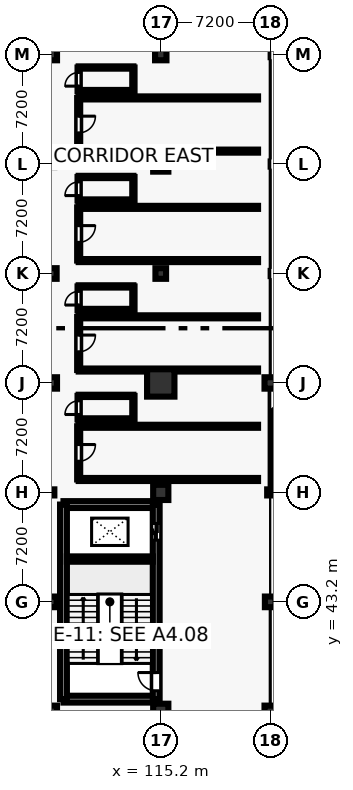
"""IFC4 building model, lengths in metres.
Left out: names, types, materials, properties, quantities, classifications, styles, units other than length and angle.
Written with IfcOpenShell. Run it as: python <this file> out.ifc"""

import sys

from ifc_helpers import new_model, si_unit, direction, frame, frame_2d, origin, origin_2d, place, context, subcontext, project, spatial, rectangle, hollow_rectangle, circle, extrude, element, fill, save


model = new_model("IFC4")
c1 = context("Model", 3, precision=1e-05, world=origin(), true_north=direction((0.0, 1.0)))
c2 = subcontext(c1, "Body", "Model", "MODEL_VIEW")
j1 = project(units=[si_unit("LENGTHUNIT", "METRE"), si_unit("PLANEANGLEUNIT", "RADIAN")], contexts=[c1])
p1 = place(None, origin())
s1 = spatial("IfcSite", under=j1, at=p1, CompositionType="ELEMENT")
p2 = place(p1, origin())
s2 = spatial("IfcBuilding", under=s1, at=p2, CompositionType="ELEMENT")
p3 = place(p2, frame((0.0, 0.0, 9.6)))
s3 = spatial("IfcBuildingStorey", under=s2, at=p3, CompositionType="ELEMENT", Elevation=9.6)
p4 = place(p3, frame((108.0, 36.0, 0.0), z_axis=(0.0, 0.0, 1.0), x_axis=(1.0, 0.0, 0.0)))
e1 = element("IfcColumn", 1, at=p4, inside=s3, PredefinedType="COLUMN", context=c2, shape_type="SweptSolid", body=[
    extrude(rectangle(XDim=0.75, YDim=0.75, at=origin_2d()), origin(), (0.0, 0.0, 1.0), 4.2),
])
p5 = place(p3, frame((108.0, 43.2, 0.0), z_axis=(0.0, 0.0, 1.0), x_axis=(1.0, 0.0, 0.0)))
e2 = element("IfcColumn", 2, at=p5, inside=s3, PredefinedType="COLUMN", context=c2, shape_type="SweptSolid", body=[
    extrude(rectangle(XDim=0.7, YDim=0.7, at=origin_2d()), origin(), (0.0, 0.0, 1.0), 4.2),
])
p6 = place(p3, frame((108.0, 50.4, 0.0), z_axis=(0.0, 0.0, 1.0), x_axis=(1.0, 0.0, 0.0)))
e3 = element("IfcColumn", 3, at=p6, inside=s3, PredefinedType="COLUMN", context=c2, shape_type="SweptSolid", body=[
    extrude(hollow_rectangle(XDim=0.4, YDim=0.4, WallThickness=0.02, at=origin_2d()), origin(), (0.0, 0.0, 1.0), 4.2),
])
p7 = place(p3, frame((108.0, 57.6, 0.0), z_axis=(0.0, 0.0, 1.0), x_axis=(1.0, 0.0, 0.0)))
e4 = element("IfcColumn", 4, at=p7, inside=s3, PredefinedType="COLUMN", context=c2, shape_type="SweptSolid", body=[
    extrude(rectangle(XDim=0.75, YDim=0.75, at=origin_2d()), origin(), (0.0, 0.0, 1.0), 4.2),
])
p8 = place(p3, frame((108.0, 64.8, 0.0), z_axis=(0.0, 0.0, 1.0), x_axis=(1.0, 0.0, 0.0)))
e5 = element("IfcColumn", 5, at=p8, inside=s3, PredefinedType="COLUMN", context=c2, shape_type="SweptSolid", body=[
    extrude(rectangle(XDim=0.7, YDim=0.7, at=origin_2d()), origin(), (0.0, 0.0, 1.0), 4.2),
])
p9 = place(p3, frame((108.0, 72.0, 0.0), z_axis=(0.0, 0.0, 1.0), x_axis=(1.0, 0.0, 0.0)))
e6 = element("IfcColumn", 6, at=p9, inside=s3, PredefinedType="COLUMN", context=c2, shape_type="SweptSolid", body=[
    extrude(hollow_rectangle(XDim=0.4, YDim=0.4, WallThickness=0.02, at=origin_2d()), origin(), (0.0, 0.0, 1.0), 4.2),
])
p10 = place(p3, frame((108.0, 79.2, 0.0), z_axis=(0.0, 0.0, 1.0), x_axis=(1.0, 0.0, 0.0)))
e7 = element("IfcColumn", 7, at=p10, inside=s3, PredefinedType="COLUMN", context=c2, shape_type="SweptSolid", body=[
    extrude(rectangle(XDim=0.75, YDim=0.75, at=origin_2d()), origin(), (0.0, 0.0, 1.0), 4.2),
])
for number, where, z_axis, x_axis in (
    (8, (115.2, 36.0, 0.0), (0.0, 0.0, 1.0), (1.0, 0.0, 0.0)),
    (9, (115.2, 50.4, 0.0), (0.0, 0.0, 1.0), (1.0, 0.0, 0.0)),
):
    element("IfcColumn", number, at=place(p3, frame(where, z_axis=z_axis, x_axis=x_axis)), inside=s3, PredefinedType="COLUMN", context=c2, shape_type="SweptSolid", body=[
        extrude(circle(Radius=0.5, at=origin_2d()), origin(), (0.0, 0.0, 1.0), 4.2),
    ])
p11 = place(p3, frame((115.2, 57.6, 0.0), z_axis=(0.0, 0.0, 1.0), x_axis=(1.0, 0.0, 0.0)))
e10 = element("IfcColumn", 10, at=p11, inside=s3, PredefinedType="COLUMN", context=c2, shape_type="SweptSolid", body=[
    extrude(circle(Radius=0.9, at=origin_2d()), origin(), (0.0, 0.0, 1.0), 4.2),
])
p12 = place(p3, frame((115.2, 64.8, 0.0), z_axis=(0.0, 0.0, 1.0), x_axis=(1.0, 0.0, 0.0)))
e11 = element("IfcColumn", 11, at=p12, inside=s3, PredefinedType="COLUMN", context=c2, shape_type="SweptSolid", body=[
    extrude(rectangle(XDim=0.7, YDim=0.7, at=origin_2d()), origin(), (0.0, 0.0, 1.0), 4.2),
])
p13 = place(p3, frame((115.2, 72.0, 0.0), z_axis=(0.0, 0.0, 1.0), x_axis=(1.0, 0.0, 0.0)))
e12 = element("IfcColumn", 12, at=p13, inside=s3, PredefinedType="COLUMN", context=c2, shape_type="SweptSolid", body=[
    extrude(circle(Radius=0.5, at=origin_2d()), origin(), (0.0, 0.0, 1.0), 4.2),
])
for number, where, z_axis, x_axis in (
    (13, (115.2, 79.2, 0.0), (0.0, 0.0, 1.0), (1.0, 0.0, 0.0)),
    (14, (122.4, 36.0, 0.0), (0.0, 0.0, 1.0), (1.0, 0.0, 0.0)),
):
    element("IfcColumn", number, at=place(p3, frame(where, z_axis=z_axis, x_axis=x_axis)), inside=s3, PredefinedType="COLUMN", context=c2, shape_type="SweptSolid", body=[
        extrude(rectangle(XDim=0.75, YDim=0.75, at=origin_2d()), origin(), (0.0, 0.0, 1.0), 4.2),
    ])
p14 = place(p3, frame((122.4, 43.2, 0.0), z_axis=(0.0, 0.0, 1.0), x_axis=(1.0, 0.0, 0.0)))
e15 = element("IfcColumn", 15, at=p14, inside=s3, PredefinedType="COLUMN", context=c2, shape_type="SweptSolid", body=[
    extrude(rectangle(XDim=0.7, YDim=0.7, at=origin_2d()), origin(), (0.0, 0.0, 1.0), 4.2),
])
p15 = place(p3, frame((122.4, 50.4, 0.0), z_axis=(0.0, 0.0, 1.0), x_axis=(1.0, 0.0, 0.0)))
e16 = element("IfcColumn", 16, at=p15, inside=s3, PredefinedType="COLUMN", context=c2, shape_type="SweptSolid", body=[
    extrude(hollow_rectangle(XDim=0.4, YDim=0.4, WallThickness=0.02, at=origin_2d()), origin(), (0.0, 0.0, 1.0), 4.2),
])
p16 = place(p3, frame((122.4, 57.6, 0.0), z_axis=(0.0, 0.0, 1.0), x_axis=(1.0, 0.0, 0.0)))
e17 = element("IfcColumn", 17, at=p16, inside=s3, PredefinedType="COLUMN", context=c2, shape_type="SweptSolid", body=[
    extrude(rectangle(XDim=0.75, YDim=0.75, at=origin_2d()), origin(), (0.0, 0.0, 1.0), 4.2),
])
for number, where, z_axis, x_axis in (
    (18, (108.8, 36.8, 0.0), (0.0, 0.0, 1.0), (1.0, 0.0, 0.0)),
    (19, (108.8, 49.6, 0.0), (0.0, 0.0, 1.0), (1.0, 0.0, 0.0)),
):
    element("IfcWall", number, at=place(p3, frame(where, z_axis=z_axis, x_axis=x_axis)), inside=s3, PredefinedType="SHEAR", context=c2, shape_type="SweptSolid", body=[
        extrude(rectangle(XDim=6.1, YDim=0.45, at=frame_2d((3.05, 0.0))), origin(), (0.0, 0.0, 1.0), 3.88),
    ])
p17 = place(p3, frame((108.8, 36.8, 0.0), z_axis=(0.0, 0.0, 1.0), x_axis=(0.0, 1.0, 0.0)))
e20 = element("IfcWall", 20, at=p17, inside=s3, PredefinedType="SHEAR", context=c2, shape_type="SweptSolid", body=[
    extrude(rectangle(XDim=12.8, YDim=0.45, at=frame_2d((6.4, 0.0))), origin(), (0.0, 0.0, 1.0), 3.88),
])
p18 = place(p3, frame((114.9, 36.8, 0.0), z_axis=(0.0, 0.0, 1.0), x_axis=(0.0, 1.0, 0.0)))
e21 = element("IfcWall", 21, at=p18, inside=s3, PredefinedType="SHEAR", context=c2, shape_type="SweptSolid", body=[
    extrude(rectangle(XDim=12.8, YDim=0.45, at=frame_2d((6.4, 0.0))), origin(), (0.0, 0.0, 1.0), 3.88),
])
p19 = place(p18, frame((0.55, 0.0, 0.0)))
e22 = element("IfcOpeningElement", 22, at=p19, cuts=e21, PredefinedType="OPENING", context=c2, shape_type="SweptSolid", body=[
    extrude(rectangle(XDim=1.2, YDim=2.25, at=frame_2d((0.6, 1.125))), frame((0.0, 0.235, 0.0), z_axis=(0.0, -1.0, 0.0), x_axis=(1.0, 0.0, 0.0)), (0.0, 0.0, 1.0), 0.47),
])
p20 = place(p18, frame((10.458, 0.0, 0.0)))
e23 = element("IfcOpeningElement", 23, at=p20, cuts=e21, PredefinedType="OPENING", context=c2, shape_type="SweptSolid", body=[
    extrude(rectangle(XDim=1.1, YDim=2.2, at=frame_2d((0.55, 1.1))), frame((0.0, 0.235, 0.0), z_axis=(0.0, -1.0, 0.0), x_axis=(1.0, 0.0, 0.0)), (0.0, 0.0, 1.0), 0.47),
])
p21 = place(p3, frame((109.025, 46.016, 0.0), z_axis=(0.0, 0.0, 1.0), x_axis=(1.0, 0.0, 0.0)))
e24 = element("IfcWall", 24, at=p21, inside=s3, PredefinedType="SHEAR", context=c2, shape_type="SweptSolid", body=[
    extrude(rectangle(XDim=5.65, YDim=0.35, at=frame_2d((2.825, 0.0))), origin(), (0.0, 0.0, 1.0), 3.88),
])
for number, where, z_axis, x_axis in (
    (25, (109.8, 51.25, 0.0), (0.0, 0.0, 1.0), (1.0, 0.0, 0.0)),
    (26, (121.6, 54.75, 0.0), (0.0, 0.0, 1.0), (-1.0, 0.0, 0.0)),
):
    element("IfcWall", number, at=place(p3, frame(where, z_axis=z_axis, x_axis=x_axis)), inside=s3, PredefinedType="PARTITIONING", context=c2, shape_type="SweptSolid", body=[
        extrude(rectangle(XDim=11.8, YDim=0.2, at=frame_2d((5.9, 0.0))), origin(), (0.0, 0.0, 1.0), 2.94),
    ])
p22 = place(p3, frame((109.8, 54.75, 0.0), z_axis=(0.0, 0.0, 1.0), x_axis=(0.0, -1.0, 0.0)))
e27 = element("IfcWall", 27, at=p22, inside=s3, PredefinedType="PARTITIONING", context=c2, shape_type="SweptSolid", body=[
    extrude(rectangle(XDim=3.5, YDim=0.2, at=frame_2d((1.75, 0.0))), origin(), (0.0, 0.0, 1.0), 2.94),
])
p23 = place(p22, frame((1.2, 0.0, 0.0)))
e28 = element("IfcOpeningElement", 28, at=p23, cuts=e27, PredefinedType="OPENING", context=c2, shape_type="SweptSolid", body=[
    extrude(rectangle(XDim=1.1, YDim=2.25, at=frame_2d((0.55, 1.125))), frame((0.0, 0.11, 0.0), z_axis=(0.0, -1.0, 0.0), x_axis=(1.0, 0.0, 0.0)), (0.0, 0.0, 1.0), 0.22),
])
p24 = place(p3, frame((109.8, 55.2, 0.0), z_axis=(0.0, 0.0, 1.0), x_axis=(1.0, 0.0, 0.0)))
e29 = element("IfcWall", 29, at=p24, inside=s3, PredefinedType="PARTITIONING", context=c2, shape_type="SweptSolid", body=[
    extrude(rectangle(XDim=3.6, YDim=0.15, at=frame_2d((1.8, 0.0))), origin(), (0.0, 0.0, 1.0), 2.94),
])
p25 = place(p3, frame((113.4, 55.2, 0.0), z_axis=(0.0, 0.0, 1.0), x_axis=(0.0, 1.0, 0.0)))
e30 = element("IfcWall", 30, at=p25, inside=s3, PredefinedType="PARTITIONING", context=c2, shape_type="SweptSolid", body=[
    extrude(rectangle(XDim=1.55, YDim=0.15, at=frame_2d((0.775, 0.0))), origin(), (0.0, 0.0, 1.0), 2.94),
])
p26 = place(p3, frame((113.4, 56.75, 0.0), z_axis=(0.0, 0.0, 1.0), x_axis=(-1.0, 0.0, 0.0)))
e31 = element("IfcWall", 31, at=p26, inside=s3, PredefinedType="PARTITIONING", context=c2, shape_type="SweptSolid", body=[
    extrude(rectangle(XDim=3.6, YDim=0.15, at=frame_2d((1.8, 0.0))), origin(), (0.0, 0.0, 1.0), 2.94),
])
p27 = place(p3, frame((109.8, 56.75, 0.0), z_axis=(0.0, 0.0, 1.0), x_axis=(0.0, -1.0, 0.0)))
e32 = element("IfcWall", 32, at=p27, inside=s3, PredefinedType="PARTITIONING", context=c2, shape_type="SweptSolid", body=[
    extrude(rectangle(XDim=1.55, YDim=0.15, at=frame_2d((0.775, 0.0))), origin(), (0.0, 0.0, 1.0), 2.94),
])
p28 = place(p27, frame((0.325, 0.0, 0.0)))
e33 = element("IfcOpeningElement", 33, at=p28, cuts=e32, PredefinedType="OPENING", context=c2, shape_type="SweptSolid", body=[
    extrude(rectangle(XDim=0.9, YDim=2.15, at=frame_2d((0.45, 1.075))), frame((0.0, 0.085, 0.0), z_axis=(0.0, -1.0, 0.0), x_axis=(1.0, 0.0, 0.0)), (0.0, 0.0, 1.0), 0.17),
])
for number, where, z_axis, x_axis in (
    (34, (109.8, 58.45, 0.0), (0.0, 0.0, 1.0), (1.0, 0.0, 0.0)),
    (35, (121.6, 61.95, 0.0), (0.0, 0.0, 1.0), (-1.0, 0.0, 0.0)),
):
    element("IfcWall", number, at=place(p3, frame(where, z_axis=z_axis, x_axis=x_axis)), inside=s3, PredefinedType="PARTITIONING", context=c2, shape_type="SweptSolid", body=[
        extrude(rectangle(XDim=11.8, YDim=0.2, at=frame_2d((5.9, 0.0))), origin(), (0.0, 0.0, 1.0), 2.94),
    ])
p29 = place(p3, frame((109.8, 61.95, 0.0), z_axis=(0.0, 0.0, 1.0), x_axis=(0.0, -1.0, 0.0)))
e36 = element("IfcWall", 36, at=p29, inside=s3, PredefinedType="PARTITIONING", context=c2, shape_type="SweptSolid", body=[
    extrude(rectangle(XDim=3.5, YDim=0.2, at=frame_2d((1.75, 0.0))), origin(), (0.0, 0.0, 1.0), 2.94),
])
p30 = place(p29, frame((1.2, 0.0, 0.0)))
e37 = element("IfcOpeningElement", 37, at=p30, cuts=e36, PredefinedType="OPENING", context=c2, shape_type="SweptSolid", body=[
    extrude(rectangle(XDim=1.1, YDim=2.25, at=frame_2d((0.55, 1.125))), frame((0.0, 0.11, 0.0), z_axis=(0.0, -1.0, 0.0), x_axis=(1.0, 0.0, 0.0)), (0.0, 0.0, 1.0), 0.22),
])
p31 = place(p3, frame((109.8, 62.4, 0.0), z_axis=(0.0, 0.0, 1.0), x_axis=(1.0, 0.0, 0.0)))
e38 = element("IfcWall", 38, at=p31, inside=s3, PredefinedType="PARTITIONING", context=c2, shape_type="SweptSolid", body=[
    extrude(rectangle(XDim=3.6, YDim=0.15, at=frame_2d((1.8, 0.0))), origin(), (0.0, 0.0, 1.0), 2.94),
])
p32 = place(p3, frame((113.4, 62.4, 0.0), z_axis=(0.0, 0.0, 1.0), x_axis=(0.0, 1.0, 0.0)))
e39 = element("IfcWall", 39, at=p32, inside=s3, PredefinedType="PARTITIONING", context=c2, shape_type="SweptSolid", body=[
    extrude(rectangle(XDim=1.55, YDim=0.15, at=frame_2d((0.775, 0.0))), origin(), (0.0, 0.0, 1.0), 2.94),
])
p33 = place(p3, frame((113.4, 63.95, 0.0), z_axis=(0.0, 0.0, 1.0), x_axis=(-1.0, 0.0, 0.0)))
e40 = element("IfcWall", 40, at=p33, inside=s3, PredefinedType="PARTITIONING", context=c2, shape_type="SweptSolid", body=[
    extrude(rectangle(XDim=3.6, YDim=0.15, at=frame_2d((1.8, 0.0))), origin(), (0.0, 0.0, 1.0), 2.94),
])
p34 = place(p3, frame((109.8, 63.95, 0.0), z_axis=(0.0, 0.0, 1.0), x_axis=(0.0, -1.0, 0.0)))
e41 = element("IfcWall", 41, at=p34, inside=s3, PredefinedType="PARTITIONING", context=c2, shape_type="SweptSolid", body=[
    extrude(rectangle(XDim=1.55, YDim=0.15, at=frame_2d((0.775, 0.0))), origin(), (0.0, 0.0, 1.0), 2.94),
])
p35 = place(p34, frame((0.325, 0.0, 0.0)))
e42 = element("IfcOpeningElement", 42, at=p35, cuts=e41, PredefinedType="OPENING", context=c2, shape_type="SweptSolid", body=[
    extrude(rectangle(XDim=0.9, YDim=2.15, at=frame_2d((0.45, 1.075))), frame((0.0, 0.085, 0.0), z_axis=(0.0, -1.0, 0.0), x_axis=(1.0, 0.0, 0.0)), (0.0, 0.0, 1.0), 0.17),
])
for number, where, z_axis, x_axis in (
    (43, (109.8, 65.65, 0.0), (0.0, 0.0, 1.0), (1.0, 0.0, 0.0)),
    (44, (121.6, 69.15, 0.0), (0.0, 0.0, 1.0), (-1.0, 0.0, 0.0)),
):
    element("IfcWall", number, at=place(p3, frame(where, z_axis=z_axis, x_axis=x_axis)), inside=s3, PredefinedType="PARTITIONING", context=c2, shape_type="SweptSolid", body=[
        extrude(rectangle(XDim=11.8, YDim=0.2, at=frame_2d((5.9, 0.0))), origin(), (0.0, 0.0, 1.0), 2.94),
    ])
p36 = place(p3, frame((109.8, 69.15, 0.0), z_axis=(0.0, 0.0, 1.0), x_axis=(0.0, -1.0, 0.0)))
e45 = element("IfcWall", 45, at=p36, inside=s3, PredefinedType="PARTITIONING", context=c2, shape_type="SweptSolid", body=[
    extrude(rectangle(XDim=3.5, YDim=0.2, at=frame_2d((1.75, 0.0))), origin(), (0.0, 0.0, 1.0), 2.94),
])
p37 = place(p36, frame((1.2, 0.0, 0.0)))
e46 = element("IfcOpeningElement", 46, at=p37, cuts=e45, PredefinedType="OPENING", context=c2, shape_type="SweptSolid", body=[
    extrude(rectangle(XDim=1.1, YDim=2.25, at=frame_2d((0.55, 1.125))), frame((0.0, 0.11, 0.0), z_axis=(0.0, -1.0, 0.0), x_axis=(1.0, 0.0, 0.0)), (0.0, 0.0, 1.0), 0.22),
])
p38 = place(p3, frame((109.8, 69.6, 0.0), z_axis=(0.0, 0.0, 1.0), x_axis=(1.0, 0.0, 0.0)))
e47 = element("IfcWall", 47, at=p38, inside=s3, PredefinedType="PARTITIONING", context=c2, shape_type="SweptSolid", body=[
    extrude(rectangle(XDim=3.6, YDim=0.15, at=frame_2d((1.8, 0.0))), origin(), (0.0, 0.0, 1.0), 2.94),
])
p39 = place(p3, frame((113.4, 69.6, 0.0), z_axis=(0.0, 0.0, 1.0), x_axis=(0.0, 1.0, 0.0)))
e48 = element("IfcWall", 48, at=p39, inside=s3, PredefinedType="PARTITIONING", context=c2, shape_type="SweptSolid", body=[
    extrude(rectangle(XDim=1.55, YDim=0.15, at=frame_2d((0.775, 0.0))), origin(), (0.0, 0.0, 1.0), 2.94),
])
p40 = place(p3, frame((113.4, 71.15, 0.0), z_axis=(0.0, 0.0, 1.0), x_axis=(-1.0, 0.0, 0.0)))
e49 = element("IfcWall", 49, at=p40, inside=s3, PredefinedType="PARTITIONING", context=c2, shape_type="SweptSolid", body=[
    extrude(rectangle(XDim=3.6, YDim=0.15, at=frame_2d((1.8, 0.0))), origin(), (0.0, 0.0, 1.0), 2.94),
])
p41 = place(p3, frame((109.8, 71.15, 0.0), z_axis=(0.0, 0.0, 1.0), x_axis=(0.0, -1.0, 0.0)))
e50 = element("IfcWall", 50, at=p41, inside=s3, PredefinedType="PARTITIONING", context=c2, shape_type="SweptSolid", body=[
    extrude(rectangle(XDim=1.55, YDim=0.15, at=frame_2d((0.775, 0.0))), origin(), (0.0, 0.0, 1.0), 2.94),
])
p42 = place(p41, frame((0.325, 0.0, 0.0)))
e51 = element("IfcOpeningElement", 51, at=p42, cuts=e50, PredefinedType="OPENING", context=c2, shape_type="SweptSolid", body=[
    extrude(rectangle(XDim=0.9, YDim=2.15, at=frame_2d((0.45, 1.075))), frame((0.0, 0.085, 0.0), z_axis=(0.0, -1.0, 0.0), x_axis=(1.0, 0.0, 0.0)), (0.0, 0.0, 1.0), 0.17),
])
for number, where, z_axis, x_axis in (
    (52, (109.8, 72.85, 0.0), (0.0, 0.0, 1.0), (1.0, 0.0, 0.0)),
    (53, (121.6, 76.35, 0.0), (0.0, 0.0, 1.0), (-1.0, 0.0, 0.0)),
):
    element("IfcWall", number, at=place(p3, frame(where, z_axis=z_axis, x_axis=x_axis)), inside=s3, PredefinedType="PARTITIONING", context=c2, shape_type="SweptSolid", body=[
        extrude(rectangle(XDim=11.8, YDim=0.2, at=frame_2d((5.9, 0.0))), origin(), (0.0, 0.0, 1.0), 2.94),
    ])
p43 = place(p3, frame((109.8, 76.35, 0.0), z_axis=(0.0, 0.0, 1.0), x_axis=(0.0, -1.0, 0.0)))
e54 = element("IfcWall", 54, at=p43, inside=s3, PredefinedType="PARTITIONING", context=c2, shape_type="SweptSolid", body=[
    extrude(rectangle(XDim=3.5, YDim=0.2, at=frame_2d((1.75, 0.0))), origin(), (0.0, 0.0, 1.0), 2.94),
])
p44 = place(p43, frame((1.2, 0.0, 0.0)))
e55 = element("IfcOpeningElement", 55, at=p44, cuts=e54, PredefinedType="OPENING", context=c2, shape_type="SweptSolid", body=[
    extrude(rectangle(XDim=1.1, YDim=2.25, at=frame_2d((0.55, 1.125))), frame((0.0, 0.11, 0.0), z_axis=(0.0, -1.0, 0.0), x_axis=(1.0, 0.0, 0.0)), (0.0, 0.0, 1.0), 0.22),
])
p45 = place(p3, frame((109.8, 76.8, 0.0), z_axis=(0.0, 0.0, 1.0), x_axis=(1.0, 0.0, 0.0)))
e56 = element("IfcWall", 56, at=p45, inside=s3, PredefinedType="PARTITIONING", context=c2, shape_type="SweptSolid", body=[
    extrude(rectangle(XDim=3.6, YDim=0.15, at=frame_2d((1.8, 0.0))), origin(), (0.0, 0.0, 1.0), 2.94),
])
p46 = place(p3, frame((113.4, 76.8, 0.0), z_axis=(0.0, 0.0, 1.0), x_axis=(0.0, 1.0, 0.0)))
e57 = element("IfcWall", 57, at=p46, inside=s3, PredefinedType="PARTITIONING", context=c2, shape_type="SweptSolid", body=[
    extrude(rectangle(XDim=1.55, YDim=0.15, at=frame_2d((0.775, 0.0))), origin(), (0.0, 0.0, 1.0), 2.94),
])
p47 = place(p3, frame((113.4, 78.35, 0.0), z_axis=(0.0, 0.0, 1.0), x_axis=(-1.0, 0.0, 0.0)))
e58 = element("IfcWall", 58, at=p47, inside=s3, PredefinedType="PARTITIONING", context=c2, shape_type="SweptSolid", body=[
    extrude(rectangle(XDim=3.6, YDim=0.15, at=frame_2d((1.8, 0.0))), origin(), (0.0, 0.0, 1.0), 2.94),
])
p48 = place(p3, frame((109.8, 78.35, 0.0), z_axis=(0.0, 0.0, 1.0), x_axis=(0.0, -1.0, 0.0)))
e59 = element("IfcWall", 59, at=p48, inside=s3, PredefinedType="PARTITIONING", context=c2, shape_type="SweptSolid", body=[
    extrude(rectangle(XDim=1.55, YDim=0.15, at=frame_2d((0.775, 0.0))), origin(), (0.0, 0.0, 1.0), 2.94),
])
p49 = place(p48, frame((0.325, 0.0, 0.0)))
e60 = element("IfcOpeningElement", 60, at=p49, cuts=e59, PredefinedType="OPENING", context=c2, shape_type="SweptSolid", body=[
    extrude(rectangle(XDim=0.9, YDim=2.15, at=frame_2d((0.45, 1.075))), frame((0.0, 0.085, 0.0), z_axis=(0.0, -1.0, 0.0), x_axis=(1.0, 0.0, 0.0)), (0.0, 0.0, 1.0), 0.17),
])
p50 = place(p19, origin())
e61 = element("IfcDoor", 61, at=p50, inside=s3, OperationType="SINGLE_SWING_RIGHT", PredefinedType="DOOR", context=c2, shape_type="SweptSolid", body=[
    extrude(rectangle(XDim=1.2, YDim=2.25, at=frame_2d((0.6, 1.125))), frame((0.0, 0.025, 0.0), z_axis=(0.0, -1.0, 0.0), x_axis=(1.0, 0.0, 0.0)), (0.0, 0.0, 1.0), 0.05),
])
fill(e22, e61)
p51 = place(p20, origin())
e62 = element("IfcDoor", 62, at=p51, inside=s3, OperationType="SLIDING_TO_LEFT", PredefinedType="DOOR", context=c2, shape_type="SweptSolid", body=[
    extrude(rectangle(XDim=1.1, YDim=2.2, at=frame_2d((0.55, 1.1))), frame((0.0, 0.025, 0.0), z_axis=(0.0, -1.0, 0.0), x_axis=(1.0, 0.0, 0.0)), (0.0, 0.0, 1.0), 0.05),
])
fill(e23, e62)
p52 = place(p23, origin())
e63 = element("IfcDoor", 63, at=p52, inside=s3, OperationType="SINGLE_SWING_LEFT", PredefinedType="DOOR", context=c2, shape_type="SweptSolid", body=[
    extrude(rectangle(XDim=1.1, YDim=2.25, at=frame_2d((0.55, 1.125))), frame((0.0, 0.025, 0.0), z_axis=(0.0, -1.0, 0.0), x_axis=(1.0, 0.0, 0.0)), (0.0, 0.0, 1.0), 0.05),
])
fill(e28, e63)
p53 = place(p28, frame((0.9, 0.0, 0.0), z_axis=(0.0, 0.0, 1.0), x_axis=(-1.0, 0.0, 0.0)))
e64 = element("IfcDoor", 64, at=p53, inside=s3, OperationType="SINGLE_SWING_RIGHT", PredefinedType="DOOR", context=c2, shape_type="SweptSolid", body=[
    extrude(rectangle(XDim=0.9, YDim=2.15, at=frame_2d((0.45, 1.075))), frame((0.0, 0.025, 0.0), z_axis=(0.0, -1.0, 0.0), x_axis=(1.0, 0.0, 0.0)), (0.0, 0.0, 1.0), 0.05),
])
fill(e33, e64)
p54 = place(p30, origin())
e65 = element("IfcDoor", 65, at=p54, inside=s3, OperationType="SINGLE_SWING_LEFT", PredefinedType="DOOR", context=c2, shape_type="SweptSolid", body=[
    extrude(rectangle(XDim=1.1, YDim=2.25, at=frame_2d((0.55, 1.125))), frame((0.0, 0.025, 0.0), z_axis=(0.0, -1.0, 0.0), x_axis=(1.0, 0.0, 0.0)), (0.0, 0.0, 1.0), 0.05),
])
fill(e37, e65)
p55 = place(p35, frame((0.9, 0.0, 0.0), z_axis=(0.0, 0.0, 1.0), x_axis=(-1.0, 0.0, 0.0)))
e66 = element("IfcDoor", 66, at=p55, inside=s3, OperationType="SINGLE_SWING_RIGHT", PredefinedType="DOOR", context=c2, shape_type="SweptSolid", body=[
    extrude(rectangle(XDim=0.9, YDim=2.15, at=frame_2d((0.45, 1.075))), frame((0.0, 0.025, 0.0), z_axis=(0.0, -1.0, 0.0), x_axis=(1.0, 0.0, 0.0)), (0.0, 0.0, 1.0), 0.05),
])
fill(e42, e66)
p56 = place(p37, origin())
e67 = element("IfcDoor", 67, at=p56, inside=s3, OperationType="SINGLE_SWING_LEFT", PredefinedType="DOOR", context=c2, shape_type="SweptSolid", body=[
    extrude(rectangle(XDim=1.1, YDim=2.25, at=frame_2d((0.55, 1.125))), frame((0.0, 0.025, 0.0), z_axis=(0.0, -1.0, 0.0), x_axis=(1.0, 0.0, 0.0)), (0.0, 0.0, 1.0), 0.05),
])
fill(e46, e67)
p57 = place(p42, frame((0.9, 0.0, 0.0), z_axis=(0.0, 0.0, 1.0), x_axis=(-1.0, 0.0, 0.0)))
e68 = element("IfcDoor", 68, at=p57, inside=s3, OperationType="SINGLE_SWING_RIGHT", PredefinedType="DOOR", context=c2, shape_type="SweptSolid", body=[
    extrude(rectangle(XDim=0.9, YDim=2.15, at=frame_2d((0.45, 1.075))), frame((0.0, 0.025, 0.0), z_axis=(0.0, -1.0, 0.0), x_axis=(1.0, 0.0, 0.0)), (0.0, 0.0, 1.0), 0.05),
])
fill(e51, e68)
p58 = place(p44, origin())
e69 = element("IfcDoor", 69, at=p58, inside=s3, OperationType="SINGLE_SWING_LEFT", PredefinedType="DOOR", context=c2, shape_type="SweptSolid", body=[
    extrude(rectangle(XDim=1.1, YDim=2.25, at=frame_2d((0.55, 1.125))), frame((0.0, 0.025, 0.0), z_axis=(0.0, -1.0, 0.0), x_axis=(1.0, 0.0, 0.0)), (0.0, 0.0, 1.0), 0.05),
])
fill(e55, e69)
p59 = place(p49, frame((0.9, 0.0, 0.0), z_axis=(0.0, 0.0, 1.0), x_axis=(-1.0, 0.0, 0.0)))
e70 = element("IfcDoor", 70, at=p59, inside=s3, OperationType="SINGLE_SWING_RIGHT", PredefinedType="DOOR", context=c2, shape_type="SweptSolid", body=[
    extrude(rectangle(XDim=0.9, YDim=2.15, at=frame_2d((0.45, 1.075))), frame((0.0, 0.025, 0.0), z_axis=(0.0, -1.0, 0.0), x_axis=(1.0, 0.0, 0.0)), (0.0, 0.0, 1.0), 0.05),
])
fill(e60, e70)
save(model, sys.argv[1])
